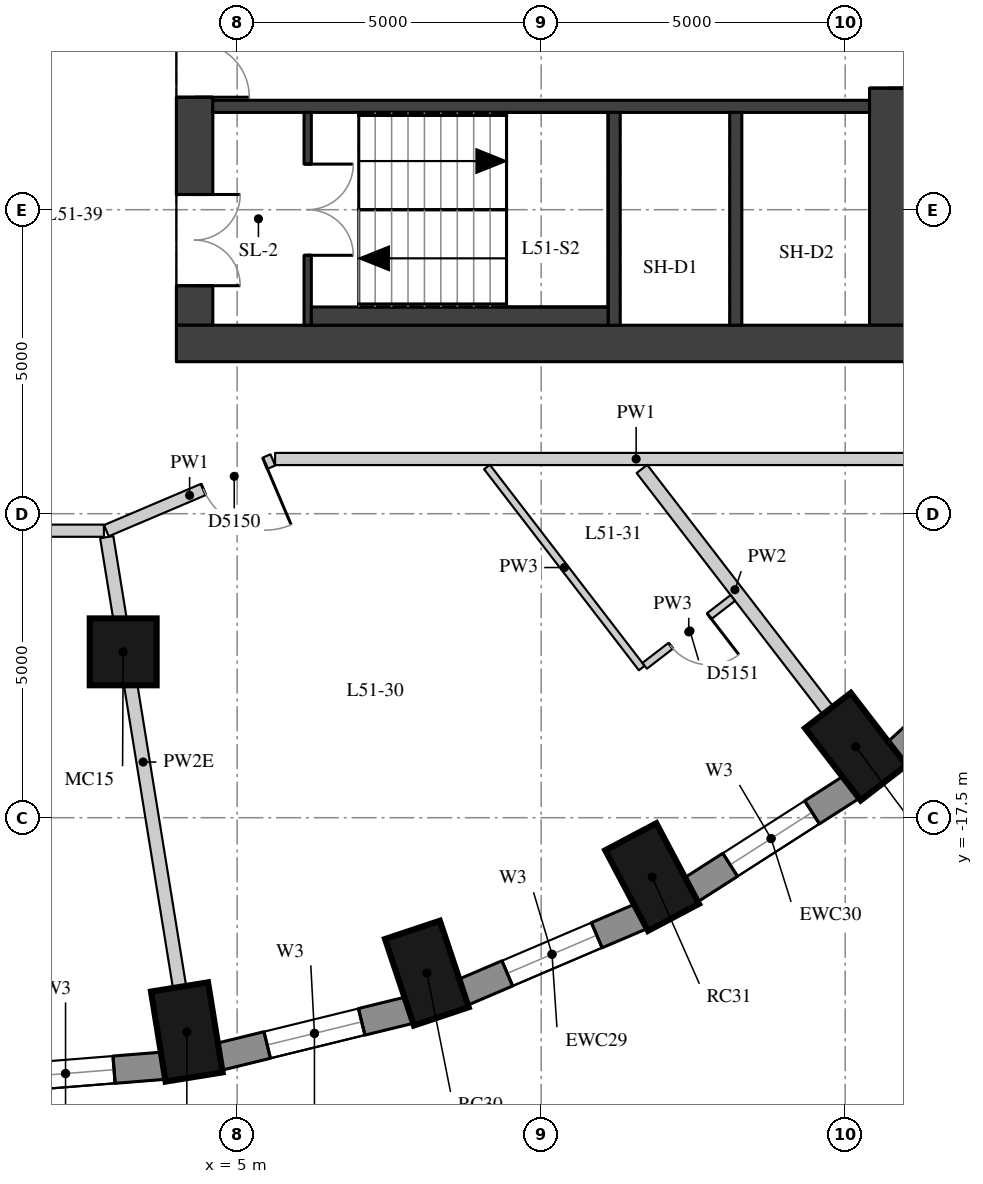
"""IFC4 building model, lengths in metres.
Left out: names, types, materials, properties, quantities, classifications, styles, units other than length and angle.
Written with IfcOpenShell. Run it as: python <this file> out.ifc"""

import sys

from ifc_helpers import new_model, si_unit, direction, frame, frame_2d, origin, origin_2d, place, context, subcontext, project, spatial, rectangle, extrude, element, fill, save


model = new_model("IFC4")
c1 = context("Model", 3, precision=1e-05, world=origin(), true_north=direction((0.0, 1.0)))
c2 = subcontext(c1, "Body", "Model", "MODEL_VIEW")
j1 = project(units=[si_unit("LENGTHUNIT", "METRE"), si_unit("PLANEANGLEUNIT", "RADIAN")], contexts=[c1])
p1 = place(None, origin())
s1 = spatial("IfcSite", under=j1, at=p1, CompositionType="ELEMENT")
p2 = place(p1, origin())
s2 = spatial("IfcBuilding", under=s1, at=p2, CompositionType="ELEMENT")
p3 = place(p2, frame((0.0, 0.0, 181.4)))
s3 = spatial("IfcBuildingStorey", under=s2, at=p3, CompositionType="ELEMENT", Elevation=181.4)
for number, where, z_axis, x_axis in (
    (1, (4.172, -21.024, 0.0), (0.0, 0.0, 1.0), (0.16, -0.987, 0.0)),
    (2, (8.12, -20.056, 0.0), (0.0, 0.0, 1.0), (0.317, -0.949, 0.0)),
    (3, (11.825, -18.476, 0.0), (0.0, 0.0, 1.0), (0.468, -0.884, 0.0)),
    (4, (15.173, -16.332, 0.0), (0.0, 0.0, 1.0), (0.61, -0.792, 0.0)),
):
    element("IfcColumn", number, at=place(p3, frame(where, z_axis=z_axis, x_axis=x_axis)), inside=s3, PredefinedType="COLUMN", context=c2, shape_type="SweptSolid", body=[
        extrude(rectangle(XDim=1.5, YDim=0.95, at=origin_2d()), origin(), (0.0, 0.0, 1.0), 3.3),
    ])
p4 = place(p3, frame((3.126, -14.772, 0.0), z_axis=(0.0, 0.0, 1.0), x_axis=(1.0, 0.0, 0.0)))
e5 = element("IfcColumn", 5, at=p4, inside=s3, PredefinedType="COLUMN", context=c2, shape_type="SweptSolid", body=[
    extrude(rectangle(XDim=1.1, YDim=1.1, at=origin_2d()), origin(), (0.0, 0.0, 1.0), 3.3),
])
p5 = place(p3, frame((0.555, -21.838, 0.0), z_axis=(0.0, 0.0, 1.0), x_axis=(0.996812416891, 0.079780984773, 0.0)))
e6 = element("IfcWall", 6, at=p5, inside=s3, PredefinedType="SOLIDWALL", context=c2, shape_type="SweptSolid", body=[
    extrude(rectangle(XDim=3.256, YDim=0.45, at=frame_2d((1.628, 0.0))), origin(), (0.0, 0.0, 1.0), 2.85),
])
p6 = place(p5, frame((0.828, 0.0, 0.4)))
e7 = element("IfcOpeningElement", 7, at=p6, cuts=e6, PredefinedType="OPENING", context=c2, shape_type="SweptSolid", body=[
    extrude(rectangle(XDim=1.6, YDim=1.75, at=frame_2d((0.8, 0.875))), frame((0.0, 0.235, 0.0), z_axis=(0.0, -1.0, 0.0), x_axis=(1.0, 0.0, 0.0)), (0.0, 0.0, 1.0), 0.47),
])
p7 = place(p3, frame((4.699, -21.433, 0.0), z_axis=(0.0, 0.0, 1.0), x_axis=(0.971237178372, 0.238114139328, 0.0)))
e8 = element("IfcWall", 8, at=p7, inside=s3, PredefinedType="SOLIDWALL", context=c2, shape_type="SweptSolid", body=[
    extrude(rectangle(XDim=3.237, YDim=0.45, at=frame_2d((1.618, 0.0))), origin(), (0.0, 0.0, 1.0), 2.85),
])
p8 = place(p7, frame((0.818, 0.0, 0.4)))
e9 = element("IfcOpeningElement", 9, at=p8, cuts=e8, PredefinedType="OPENING", context=c2, shape_type="SweptSolid", body=[
    extrude(rectangle(XDim=1.6, YDim=1.75, at=frame_2d((0.8, 0.875))), frame((0.0, 0.235, 0.0), z_axis=(0.0, -1.0, 0.0), x_axis=(1.0, 0.0, 0.0)), (0.0, 0.0, 1.0), 0.47),
])
p9 = place(p3, frame((8.706, -20.375, 0.0), z_axis=(0.0, 0.0, 1.0), x_axis=(0.91981046949, 0.392362969986, 0.0)))
e10 = element("IfcWall", 10, at=p9, inside=s3, PredefinedType="SOLIDWALL", context=c2, shape_type="SweptSolid", body=[
    extrude(rectangle(XDim=3.201, YDim=0.45, at=frame_2d((1.6, 0.0))), origin(), (0.0, 0.0, 1.0), 2.85),
])
p10 = place(p9, frame((0.8, 0.0, 0.4)))
e11 = element("IfcOpeningElement", 11, at=p10, cuts=e10, PredefinedType="OPENING", context=c2, shape_type="SweptSolid", body=[
    extrude(rectangle(XDim=1.6, YDim=1.75, at=frame_2d((0.8, 0.875))), frame((0.0, 0.235, 0.0), z_axis=(0.0, -1.0, 0.0), x_axis=(1.0, 0.0, 0.0)), (0.0, 0.0, 1.0), 0.47),
])
p11 = place(p3, frame((12.455, -18.693, 0.0), z_axis=(0.0, 0.0, 1.0), x_axis=(0.842065914439, 0.539374633943, 0.0)))
e12 = element("IfcWall", 12, at=p11, inside=s3, PredefinedType="SOLIDWALL", context=c2, shape_type="SweptSolid", body=[
    extrude(rectangle(XDim=3.151, YDim=0.45, at=frame_2d((1.576, 0.0))), origin(), (0.0, 0.0, 1.0), 2.85),
])
p12 = place(p11, frame((0.776, 0.0, 0.4)))
e13 = element("IfcOpeningElement", 13, at=p12, cuts=e12, PredefinedType="OPENING", context=c2, shape_type="SweptSolid", body=[
    extrude(rectangle(XDim=1.6, YDim=1.75, at=frame_2d((0.8, 0.875))), frame((0.0, 0.235, 0.0), z_axis=(0.0, -1.0, 0.0), x_axis=(1.0, 0.0, 0.0)), (0.0, 0.0, 1.0), 0.47),
])
p13 = place(p3, frame((15.83, -16.439, 0.0), z_axis=(0.0, 0.0, 1.0), x_axis=(0.737808755941, 0.675009807082, 0.0)))
e14 = element("IfcWall", 14, at=p13, inside=s3, PredefinedType="SOLIDWALL", context=c2, shape_type="SweptSolid", body=[
    extrude(rectangle(XDim=3.094, YDim=0.45, at=frame_2d((1.547, 0.0))), origin(), (0.0, 0.0, 1.0), 2.85),
])
p14 = place(p3, frame((4.3, -9.4, 0.0), z_axis=(0.0, 0.0, 1.0), x_axis=(0.0, 1.0, 0.0)))
e15 = element("IfcWall", 15, at=p14, inside=s3, PredefinedType="SHEAR", context=c2, shape_type="SweptSolid", body=[
    extrude(rectangle(XDim=18.8, YDim=0.6, at=frame_2d((9.4, 0.0))), origin(), (0.0, 0.0, 1.0), 2.85),
])
p15 = place(p14, frame((0.65, 0.0, 0.0)))
e16 = element("IfcOpeningElement", 16, at=p15, cuts=e15, PredefinedType="OPENING", context=c2, shape_type="SweptSolid", body=[
    extrude(rectangle(XDim=1.5, YDim=2.1, at=frame_2d((0.75, 1.05))), frame((0.0, 0.31, 0.0), z_axis=(0.0, -1.0, 0.0), x_axis=(1.0, 0.0, 0.0)), (0.0, 0.0, 1.0), 0.62),
])
p16 = place(p14, frame((3.75, 0.0, 0.0)))
e17 = element("IfcOpeningElement", 17, at=p16, cuts=e15, PredefinedType="OPENING", context=c2, shape_type="SweptSolid", body=[
    extrude(rectangle(XDim=1.8, YDim=2.1, at=frame_2d((0.9, 1.05))), frame((0.0, 0.31, 0.0), z_axis=(0.0, -1.0, 0.0), x_axis=(1.0, 0.0, 0.0)), (0.0, 0.0, 1.0), 0.62),
])
p17 = place(p14, frame((6.25, 0.0, 0.0)))
e18 = element("IfcOpeningElement", 18, at=p17, cuts=e15, PredefinedType="OPENING", context=c2, shape_type="SweptSolid", body=[
    extrude(rectangle(XDim=1.1, YDim=2.1, at=frame_2d((0.55, 1.05))), frame((0.0, 0.31, 0.0), z_axis=(0.0, -1.0, 0.0), x_axis=(1.0, 0.0, 0.0)), (0.0, 0.0, 1.0), 0.62),
])
p18 = place(p14, frame((8.9, 0.0, 0.0)))
e19 = element("IfcOpeningElement", 19, at=p18, cuts=e15, PredefinedType="OPENING", context=c2, shape_type="SweptSolid", body=[
    extrude(rectangle(XDim=1.0, YDim=2.1, at=frame_2d((0.5, 1.05))), frame((0.0, 0.31, 0.0), z_axis=(0.0, -1.0, 0.0), x_axis=(1.0, 0.0, 0.0)), (0.0, 0.0, 1.0), 0.62),
])
p19 = place(p14, frame((11.45, 0.0, 0.0)))
e20 = element("IfcOpeningElement", 20, at=p19, cuts=e15, PredefinedType="OPENING", context=c2, shape_type="SweptSolid", body=[
    extrude(rectangle(XDim=1.1, YDim=2.1, at=frame_2d((0.55, 1.05))), frame((0.0, 0.31, 0.0), z_axis=(0.0, -1.0, 0.0), x_axis=(1.0, 0.0, 0.0)), (0.0, 0.0, 1.0), 0.62),
])
p20 = place(p14, frame((13.25, 0.0, 0.0)))
e21 = element("IfcOpeningElement", 21, at=p20, cuts=e15, PredefinedType="OPENING", context=c2, shape_type="SweptSolid", body=[
    extrude(rectangle(XDim=1.8, YDim=2.1, at=frame_2d((0.9, 1.05))), frame((0.0, 0.31, 0.0), z_axis=(0.0, -1.0, 0.0), x_axis=(1.0, 0.0, 0.0)), (0.0, 0.0, 1.0), 0.62),
])
p21 = place(p14, frame((16.65, 0.0, 0.0)))
e22 = element("IfcOpeningElement", 22, at=p21, cuts=e15, PredefinedType="OPENING", context=c2, shape_type="SweptSolid", body=[
    extrude(rectangle(XDim=1.5, YDim=2.1, at=frame_2d((0.75, 1.05))), frame((0.0, 0.31, 0.0), z_axis=(0.0, -1.0, 0.0), x_axis=(1.0, 0.0, 0.0)), (0.0, 0.0, 1.0), 0.62),
])
p22 = place(p3, frame((15.7, -9.4, 0.0), z_axis=(0.0, 0.0, 1.0), x_axis=(0.0, 1.0, 0.0)))
e23 = element("IfcWall", 23, at=p22, inside=s3, PredefinedType="SHEAR", context=c2, shape_type="SweptSolid", body=[
    extrude(rectangle(XDim=18.8, YDim=0.6, at=frame_2d((9.4, 0.0))), origin(), (0.0, 0.0, 1.0), 2.85),
])
p23 = place(p22, frame((13.4, 0.0, 0.0)))
e24 = element("IfcOpeningElement", 24, at=p23, cuts=e23, PredefinedType="OPENING", context=c2, shape_type="SweptSolid", body=[
    extrude(rectangle(XDim=1.5, YDim=2.1, at=frame_2d((0.75, 1.05))), frame((0.0, 0.31, 0.0), z_axis=(0.0, -1.0, 0.0), x_axis=(1.0, 0.0, 0.0)), (0.0, 0.0, 1.0), 0.62),
])
p24 = place(p22, frame((3.9, 0.0, 0.0)))
e25 = element("IfcOpeningElement", 25, at=p24, cuts=e23, PredefinedType="OPENING", context=c2, shape_type="SweptSolid", body=[
    extrude(rectangle(XDim=1.5, YDim=2.1, at=frame_2d((0.75, 1.05))), frame((0.0, 0.31, 0.0), z_axis=(0.0, -1.0, 0.0), x_axis=(1.0, 0.0, 0.0)), (0.0, 0.0, 1.0), 0.62),
])
p25 = place(p3, frame((4.0, -9.7, 0.0), z_axis=(0.0, 0.0, 1.0), x_axis=(1.0, 0.0, 0.0)))
e26 = element("IfcWall", 26, at=p25, inside=s3, PredefinedType="SHEAR", context=c2, shape_type="SweptSolid", body=[
    extrude(rectangle(XDim=12.0, YDim=0.6, at=frame_2d((6.0, 0.0))), origin(), (0.0, 0.0, 1.0), 2.85),
])
p26 = place(p3, frame((4.6, -5.8, 0.0), z_axis=(0.0, 0.0, 1.0), x_axis=(1.0, 0.0, 0.0)))
e27 = element("IfcWall", 27, at=p26, inside=s3, PredefinedType="SHEAR", context=c2, shape_type="SweptSolid", body=[
    extrude(rectangle(XDim=10.8, YDim=0.2, at=frame_2d((5.4, 0.0))), origin(), (0.0, 0.0, 1.0), 2.85),
])
for number, where, z_axis, x_axis in (
    (28, (11.2, -9.4, 0.0), (0.0, 0.0, 1.0), (0.0, 1.0, 0.0)),
    (29, (13.2, -9.4, 0.0), (0.0, 0.0, 1.0), (0.0, 1.0, 0.0)),
):
    element("IfcWall", number, at=place(p3, frame(where, z_axis=z_axis, x_axis=x_axis)), inside=s3, PredefinedType="SHEAR", context=c2, shape_type="SweptSolid", body=[
        extrude(rectangle(XDim=3.5, YDim=0.2, at=frame_2d((1.75, 0.0))), origin(), (0.0, 0.0, 1.0), 2.85),
    ])
p27 = place(p3, frame((6.16, -9.4, 0.0), z_axis=(0.0, 0.0, 1.0), x_axis=(0.0, 1.0, 0.0)))
e30 = element("IfcWall", 30, at=p27, inside=s3, PredefinedType="SHEAR", context=c2, shape_type="SweptSolid", body=[
    extrude(rectangle(XDim=3.5, YDim=0.12, at=frame_2d((1.75, 0.0))), origin(), (0.0, 0.0, 1.0), 2.85),
])
p28 = place(p27, frame((1.15, 0.0, 0.0)))
e31 = element("IfcOpeningElement", 31, at=p28, cuts=e30, PredefinedType="OPENING", context=c2, shape_type="SweptSolid", body=[
    extrude(rectangle(XDim=1.5, YDim=2.1, at=frame_2d((0.75, 1.05))), frame((0.0, 0.07, 0.0), z_axis=(0.0, -1.0, 0.0), x_axis=(1.0, 0.0, 0.0)), (0.0, 0.0, 1.0), 0.14),
])
p29 = place(p3, frame((6.22, -9.25, 0.0), z_axis=(0.0, 0.0, 1.0), x_axis=(1.0, 0.0, 0.0)))
e32 = element("IfcWall", 32, at=p29, inside=s3, PredefinedType="PARTITIONING", context=c2, shape_type="SweptSolid", body=[
    extrude(rectangle(XDim=4.88, YDim=0.3, at=frame_2d((2.44, 0.0))), origin(), (0.0, 0.0, 1.0), 2.85),
])
p30 = place(p3, frame((17.5, -11.6, 0.0), z_axis=(0.0, 0.0, 1.0), x_axis=(-1.0, 0.0, 0.0)))
e33 = element("IfcWall", 33, at=p30, inside=s3, PredefinedType="PARTITIONING", context=c2, shape_type="SweptSolid", body=[
    extrude(rectangle(XDim=11.876, YDim=0.2, at=frame_2d((5.938, 0.0))), origin(), (0.0, 0.0, 1.0), 2.85),
])
p31 = place(p3, frame((5.587, -11.616, 0.0), z_axis=(0.0, 0.0, 1.0), x_axis=(-0.920312454828, -0.391184081334, 0.0)))
e34 = element("IfcWall", 34, at=p31, inside=s3, PredefinedType="PARTITIONING", context=c2, shape_type="SweptSolid", body=[
    extrude(rectangle(XDim=2.975, YDim=0.2, at=frame_2d((1.488, 0.0))), origin(), (0.0, 0.0, 1.0), 2.85),
])
p32 = place(p31, frame((0.14, 0.0, 0.0)))
e35 = element("IfcOpeningElement", 35, at=p32, cuts=e34, PredefinedType="OPENING", context=c2, shape_type="SweptSolid", body=[
    extrude(rectangle(XDim=1.1, YDim=2.1, at=frame_2d((0.55, 1.05))), frame((0.0, 0.11, 0.0), z_axis=(0.0, -1.0, 0.0), x_axis=(1.0, 0.0, 0.0)), (0.0, 0.0, 1.0), 0.22),
])
p33 = place(p3, frame((2.809, -12.78, 0.0), z_axis=(0.0, 0.0, 1.0), x_axis=(-1.0, 0.0, 0.0)))
e36 = element("IfcWall", 36, at=p33, inside=s3, PredefinedType="PARTITIONING", context=c2, shape_type="SweptSolid", body=[
    extrude(rectangle(XDim=5.458, YDim=0.2, at=frame_2d((2.729, 0.0))), origin(), (0.0, 0.0, 1.0), 2.85),
])
p34 = place(p33, frame((2.179, 0.0, 0.0)))
e37 = element("IfcOpeningElement", 37, at=p34, cuts=e36, PredefinedType="OPENING", context=c2, shape_type="SweptSolid", body=[
    extrude(rectangle(XDim=1.1, YDim=2.1, at=frame_2d((0.55, 1.05))), frame((0.0, 0.11, 0.0), z_axis=(0.0, -1.0, 0.0), x_axis=(1.0, 0.0, 0.0)), (0.0, 0.0, 1.0), 0.22),
])
p35 = place(p3, frame((4.052, -20.284, 0.0), z_axis=(0.0, 0.0, 1.0), x_axis=(-0.159690244465, 0.987167172176, 0.0)))
e38 = element("IfcWall", 38, at=p35, inside=s3, PredefinedType="PARTITIONING", context=c2, shape_type="SweptSolid", body=[
    extrude(rectangle(XDim=7.494, YDim=0.22, at=frame_2d((3.747, 0.0))), origin(), (0.0, 0.0, 1.0), 2.4),
])
p36 = place(p3, frame((14.716, -15.737, 0.0), z_axis=(0.0, 0.0, 1.0), x_axis=(-0.609986007715, 0.792412184657, 0.0)))
e39 = element("IfcWall", 39, at=p36, inside=s3, PredefinedType="PARTITIONING", context=c2, shape_type="SweptSolid", body=[
    extrude(rectangle(XDim=5.015, YDim=0.22, at=frame_2d((2.507, 0.0))), origin(), (0.0, 0.0, 1.0), 2.85),
])
p37 = place(p3, frame((9.109, -11.732, 0.0), z_axis=(0.0, 0.0, 1.0), x_axis=(0.609996270026, -0.79240428479, 0.0)))
e40 = element("IfcWall", 40, at=p37, inside=s3, PredefinedType="PARTITIONING", context=c2, shape_type="SweptSolid", body=[
    extrude(rectangle(XDim=4.173, YDim=0.12, at=frame_2d((2.087, 0.0))), origin(), (0.0, 0.0, 1.0), 2.85),
])
p38 = place(p3, frame((11.702, -15.002, 0.0), z_axis=(0.0, 0.0, 1.0), x_axis=(0.792395776304, 0.610007322657, 0.0)))
e41 = element("IfcWall", 41, at=p38, inside=s3, PredefinedType="PARTITIONING", context=c2, shape_type="SweptSolid", body=[
    extrude(rectangle(XDim=1.83, YDim=0.12, at=frame_2d((0.915, 0.0))), origin(), (0.0, 0.0, 1.0), 2.85),
])
p39 = place(p38, frame((0.54, 0.0, 0.0)))
e42 = element("IfcOpeningElement", 42, at=p39, cuts=e41, PredefinedType="OPENING", context=c2, shape_type="SweptSolid", body=[
    extrude(rectangle(XDim=0.8, YDim=2.1, at=frame_2d((0.4, 1.05))), frame((0.0, 0.07, 0.0), z_axis=(0.0, -1.0, 0.0), x_axis=(1.0, 0.0, 0.0)), (0.0, 0.0, 1.0), 0.14),
])
p40 = place(p6, origin())
e43 = element("IfcWindow", 43, at=p40, inside=s3, PartitioningType="SINGLE_PANEL", PredefinedType="WINDOW", context=c2, shape_type="SweptSolid", body=[
    extrude(rectangle(XDim=1.6, YDim=1.75, at=frame_2d((0.8, 0.875))), frame((0.0, 0.035, 0.0), z_axis=(0.0, -1.0, 0.0), x_axis=(1.0, 0.0, 0.0)), (0.0, 0.0, 1.0), 0.06),
])
fill(e7, e43)
p41 = place(p8, origin())
e44 = element("IfcWindow", 44, at=p41, inside=s3, PartitioningType="SINGLE_PANEL", PredefinedType="WINDOW", context=c2, shape_type="SweptSolid", body=[
    extrude(rectangle(XDim=1.6, YDim=1.75, at=frame_2d((0.8, 0.875))), frame((0.0, 0.035, 0.0), z_axis=(0.0, -1.0, 0.0), x_axis=(1.0, 0.0, 0.0)), (0.0, 0.0, 1.0), 0.06),
])
fill(e9, e44)
p42 = place(p10, origin())
e45 = element("IfcWindow", 45, at=p42, inside=s3, PartitioningType="SINGLE_PANEL", PredefinedType="WINDOW", context=c2, shape_type="SweptSolid", body=[
    extrude(rectangle(XDim=1.6, YDim=1.75, at=frame_2d((0.8, 0.875))), frame((0.0, 0.035, 0.0), z_axis=(0.0, -1.0, 0.0), x_axis=(1.0, 0.0, 0.0)), (0.0, 0.0, 1.0), 0.06),
])
fill(e11, e45)
p43 = place(p12, origin())
e46 = element("IfcWindow", 46, at=p43, inside=s3, PartitioningType="SINGLE_PANEL", PredefinedType="WINDOW", context=c2, shape_type="SweptSolid", body=[
    extrude(rectangle(XDim=1.6, YDim=1.75, at=frame_2d((0.8, 0.875))), frame((0.0, 0.035, 0.0), z_axis=(0.0, -1.0, 0.0), x_axis=(1.0, 0.0, 0.0)), (0.0, 0.0, 1.0), 0.06),
])
fill(e13, e46)
p44 = place(p15, origin())
e47 = element("IfcDoor", 47, at=p44, inside=s3, OperationType="DOUBLE_DOOR_SINGLE_SWING", PredefinedType="DOOR", context=c2, shape_type="SweptSolid", body=[
    extrude(rectangle(XDim=1.5, YDim=2.1, at=frame_2d((0.75, 1.05))), frame((0.0, 0.025, 0.0), z_axis=(0.0, -1.0, 0.0), x_axis=(1.0, 0.0, 0.0)), (0.0, 0.0, 1.0), 0.05),
])
fill(e16, e47)
p45 = place(p16, origin())
e48 = element("IfcDoor", 48, at=p45, inside=s3, OperationType="DOUBLE_DOOR_SINGLE_SWING", PredefinedType="DOOR", context=c2, shape_type="SweptSolid", body=[
    extrude(rectangle(XDim=1.8, YDim=2.1, at=frame_2d((0.9, 1.05))), frame((0.0, 0.025, 0.0), z_axis=(0.0, -1.0, 0.0), x_axis=(1.0, 0.0, 0.0)), (0.0, 0.0, 1.0), 0.05),
])
fill(e17, e48)
p46 = place(p24, origin())
e49 = element("IfcDoor", 49, at=p46, inside=s3, OperationType="DOUBLE_DOOR_SINGLE_SWING", PredefinedType="DOOR", context=c2, shape_type="SweptSolid", body=[
    extrude(rectangle(XDim=1.5, YDim=2.1, at=frame_2d((0.75, 1.05))), frame((0.0, 0.025, 0.0), z_axis=(0.0, -1.0, 0.0), x_axis=(1.0, 0.0, 0.0)), (0.0, 0.0, 1.0), 0.05),
])
fill(e25, e49)
p47 = place(p28, origin())
e50 = element("IfcDoor", 50, at=p47, inside=s3, OperationType="DOUBLE_DOOR_SINGLE_SWING", PredefinedType="DOOR", context=c2, shape_type="SweptSolid", body=[
    extrude(rectangle(XDim=1.5, YDim=2.1, at=frame_2d((0.75, 1.05))), frame((0.0, 0.025, 0.0), z_axis=(0.0, -1.0, 0.0), x_axis=(1.0, 0.0, 0.0)), (0.0, 0.0, 1.0), 0.05),
])
fill(e31, e50)
p48 = place(p32, origin())
e51 = element("IfcDoor", 51, at=p48, inside=s3, OperationType="SINGLE_SWING_LEFT", PredefinedType="DOOR", context=c2, shape_type="SweptSolid", body=[
    extrude(rectangle(XDim=1.1, YDim=2.1, at=frame_2d((0.55, 1.05))), frame((0.0, 0.025, 0.0), z_axis=(0.0, -1.0, 0.0), x_axis=(1.0, 0.0, 0.0)), (0.0, 0.0, 1.0), 0.05),
])
fill(e35, e51)
p49 = place(p39, origin())
e52 = element("IfcDoor", 52, at=p49, inside=s3, OperationType="SINGLE_SWING_LEFT", PredefinedType="DOOR", context=c2, shape_type="SweptSolid", body=[
    extrude(rectangle(XDim=0.8, YDim=2.1, at=frame_2d((0.4, 1.05))), frame((0.0, 0.025, 0.0), z_axis=(0.0, -1.0, 0.0), x_axis=(1.0, 0.0, 0.0)), (0.0, 0.0, 1.0), 0.05),
])
fill(e42, e52)
save(model, sys.argv[1])
